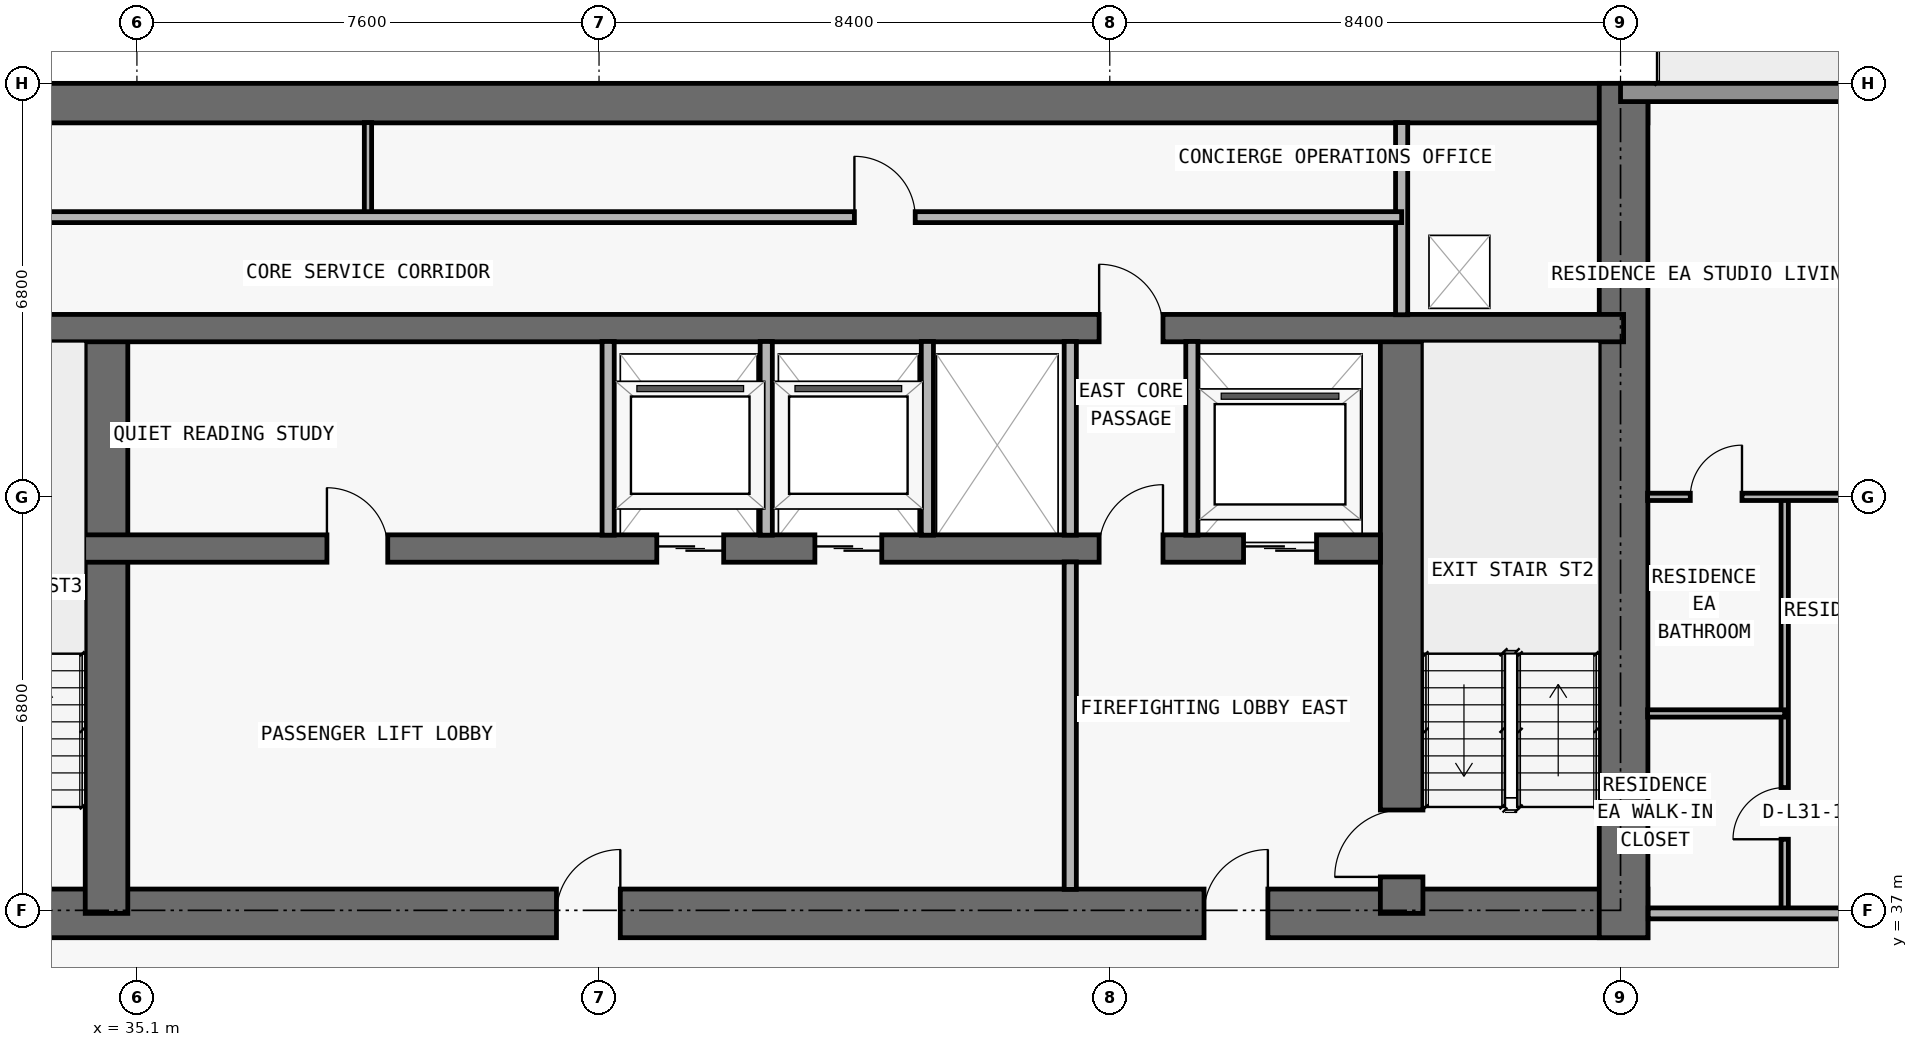
"""IFC4 building model, lengths in metres.
Left out: names, types, materials, properties, quantities, classifications, styles, units other than length and angle.
Written with IfcOpenShell. Run it as: python <this file> out.ifc"""

import sys

from ifc_helpers import new_model, si_unit, direction, frame, frame_2d, origin, place, context, subcontext, project, spatial, rectangle, extrude, element, fill, save


model = new_model("IFC4")
c1 = context("Model", 3, precision=1e-05, world=origin(), true_north=direction((0.0, 1.0)))
c2 = subcontext(c1, "Body", "Model", "MODEL_VIEW")
j1 = project(units=[si_unit("LENGTHUNIT", "METRE"), si_unit("PLANEANGLEUNIT", "RADIAN")], contexts=[c1])
p1 = place(None, origin())
s1 = spatial("IfcSite", under=j1, at=p1, CompositionType="ELEMENT")
p2 = place(p1, origin())
s2 = spatial("IfcBuilding", under=s1, at=p2, CompositionType="ELEMENT")
p3 = place(p2, frame((0.0, 0.0, 115.8)))
s3 = spatial("IfcBuildingStorey", under=s2, at=p3, CompositionType="ELEMENT", Elevation=115.8)
p4 = place(p3, frame((17.85, 36.95, 0.0), z_axis=(0.0, 0.0, 1.0), x_axis=(1.0, 0.0, 0.0)))
e1 = element("IfcWall", 1, at=p4, inside=s3, PredefinedType="SHEAR", context=c2, shape_type="SweptSolid", body=[
    extrude(rectangle(XDim=42.1, YDim=0.8, at=frame_2d((21.05, 0.0))), origin(), (0.0, 0.0, 1.0), 3.05),
])
p5 = place(p4, frame((14.45, 0.0, 0.0)))
e2 = element("IfcOpeningElement", 2, at=p5, cuts=e1, PredefinedType="OPENING", context=c2, shape_type="SweptSolid", body=[
    extrude(rectangle(XDim=1.1, YDim=2.15, at=frame_2d((0.55, 1.075))), frame((0.0, 0.41, 0.0), z_axis=(0.0, -1.0, 0.0), x_axis=(1.0, 0.0, 0.0)), (0.0, 0.0, 1.0), 0.82),
])
p6 = place(p4, frame((6.3, 0.0, 0.0)))
e3 = element("IfcOpeningElement", 3, at=p6, cuts=e1, PredefinedType="OPENING", context=c2, shape_type="SweptSolid", body=[
    extrude(rectangle(XDim=1.05, YDim=2.15, at=frame_2d((0.525, 1.075))), frame((0.0, 0.41, 0.0), z_axis=(0.0, -1.0, 0.0), x_axis=(1.0, 0.0, 0.0)), (0.0, 0.0, 1.0), 0.82),
])
p7 = place(p4, frame((34.8, 0.0, 0.0)))
e4 = element("IfcOpeningElement", 4, at=p7, cuts=e1, PredefinedType="OPENING", context=c2, shape_type="SweptSolid", body=[
    extrude(rectangle(XDim=1.05, YDim=2.15, at=frame_2d((0.525, 1.075))), frame((0.0, 0.41, 0.0), z_axis=(0.0, -1.0, 0.0), x_axis=(1.0, 0.0, 0.0)), (0.0, 0.0, 1.0), 0.82),
])
p8 = place(p4, frame((10.913, 0.0, 0.0)))
e5 = element("IfcOpeningElement", 5, at=p8, cuts=e1, PredefinedType="OPENING", context=c2, shape_type="SweptSolid", body=[
    extrude(rectangle(XDim=1.05, YDim=2.15, at=frame_2d((0.525, 1.075))), frame((0.0, 0.41, 0.0), z_axis=(0.0, -1.0, 0.0), x_axis=(1.0, 0.0, 0.0)), (0.0, 0.0, 1.0), 0.82),
])
p9 = place(p4, frame((24.15, 0.0, 0.0)))
e6 = element("IfcOpeningElement", 6, at=p9, cuts=e1, PredefinedType="OPENING", context=c2, shape_type="SweptSolid", body=[
    extrude(rectangle(XDim=1.05, YDim=2.15, at=frame_2d((0.525, 1.075))), frame((0.0, 0.41, 0.0), z_axis=(0.0, -1.0, 0.0), x_axis=(1.0, 0.0, 0.0)), (0.0, 0.0, 1.0), 0.82),
])
p10 = place(p3, frame((17.85, 50.275, 0.0), z_axis=(0.0, 0.0, 1.0), x_axis=(1.0, 0.0, 0.0)))
e7 = element("IfcWall", 7, at=p10, inside=s3, PredefinedType="SHEAR", context=c2, shape_type="SweptSolid", body=[
    extrude(rectangle(XDim=42.1, YDim=0.65, at=frame_2d((21.05, 0.0))), origin(), (0.0, 0.0, 1.0), 3.05),
])
p11 = place(p3, frame((59.55, 36.55, 0.0), z_axis=(0.0, 0.0, 1.0), x_axis=(0.0, 1.0, 0.0)))
e8 = element("IfcWall", 8, at=p11, inside=s3, PredefinedType="SHEAR", context=c2, shape_type="SweptSolid", body=[
    extrude(rectangle(XDim=14.05, YDim=0.8, at=frame_2d((7.025, 0.0))), origin(), (0.0, 0.0, 1.0), 3.05),
])
p12 = place(p3, frame((55.9, 36.95, 0.0), z_axis=(0.0, 0.0, 1.0), x_axis=(0.0, 1.0, 0.0)))
e9 = element("IfcWall", 9, at=p12, inside=s3, PredefinedType="SHEAR", context=c2, shape_type="SweptSolid", body=[
    extrude(rectangle(XDim=9.625, YDim=0.7, at=frame_2d((4.812, 0.0))), origin(), (0.0, 0.0, 1.0), 3.05),
])
p13 = place(p12, frame((0.6, 0.0, 0.0)))
e10 = element("IfcOpeningElement", 10, at=p13, cuts=e9, PredefinedType="OPENING", context=c2, shape_type="SweptSolid", body=[
    extrude(rectangle(XDim=1.1, YDim=2.15, at=frame_2d((0.55, 1.075))), frame((0.0, 0.36, 0.0), z_axis=(0.0, -1.0, 0.0), x_axis=(1.0, 0.0, 0.0)), (0.0, 0.0, 1.0), 0.72),
])
p14 = place(p3, frame((34.6, 36.95, 0.0), z_axis=(0.0, 0.0, 1.0), x_axis=(0.0, 1.0, 0.0)))
e11 = element("IfcWall", 11, at=p14, inside=s3, PredefinedType="SHEAR", context=c2, shape_type="SweptSolid", body=[
    extrude(rectangle(XDim=9.625, YDim=0.7, at=frame_2d((4.812, 0.0))), origin(), (0.0, 0.0, 1.0), 3.05),
])
p15 = place(p3, frame((22.25, 42.95, 0.0), z_axis=(0.0, 0.0, 1.0), x_axis=(1.0, 0.0, 0.0)))
e12 = element("IfcWall", 12, at=p15, inside=s3, PredefinedType="SHEAR", context=c2, shape_type="SweptSolid", body=[
    extrude(rectangle(XDim=33.3, YDim=0.45, at=frame_2d((16.65, 0.0))), origin(), (0.0, 0.0, 1.0), 3.05),
])
p16 = place(p15, frame((1.05, 0.0, 0.0)))
e13 = element("IfcOpeningElement", 13, at=p16, cuts=e12, PredefinedType="OPENING", context=c2, shape_type="SweptSolid", body=[
    extrude(rectangle(XDim=1.2, YDim=2.2, at=frame_2d((0.6, 1.1))), frame((0.0, 0.235, 0.0), z_axis=(0.0, -1.0, 0.0), x_axis=(1.0, 0.0, 0.0)), (0.0, 0.0, 1.0), 0.47),
])
p17 = place(p15, frame((31.05, 0.0, 0.0)))
e14 = element("IfcOpeningElement", 14, at=p17, cuts=e12, PredefinedType="OPENING", context=c2, shape_type="SweptSolid", body=[
    extrude(rectangle(XDim=1.2, YDim=2.2, at=frame_2d((0.6, 1.1))), frame((0.0, 0.235, 0.0), z_axis=(0.0, -1.0, 0.0), x_axis=(1.0, 0.0, 0.0)), (0.0, 0.0, 1.0), 0.47),
])
p18 = place(p15, frame((21.4, 0.0, 0.0)))
e15 = element("IfcOpeningElement", 15, at=p18, cuts=e12, PredefinedType="OPENING", context=c2, shape_type="SweptSolid", body=[
    extrude(rectangle(XDim=1.1, YDim=2.2, at=frame_2d((0.55, 1.1))), frame((0.0, 0.235, 0.0), z_axis=(0.0, -1.0, 0.0), x_axis=(1.0, 0.0, 0.0)), (0.0, 0.0, 1.0), 0.47),
])
p19 = place(p15, frame((24.0, 0.0, 0.0)))
e16 = element("IfcOpeningElement", 16, at=p19, cuts=e12, PredefinedType="OPENING", context=c2, shape_type="SweptSolid", body=[
    extrude(rectangle(XDim=1.1, YDim=2.2, at=frame_2d((0.55, 1.1))), frame((0.0, 0.235, 0.0), z_axis=(0.0, -1.0, 0.0), x_axis=(1.0, 0.0, 0.0)), (0.0, 0.0, 1.0), 0.47),
])
p20 = place(p15, frame((3.625, 0.0, 0.0)))
e17 = element("IfcOpeningElement", 17, at=p20, cuts=e12, PredefinedType="OPENING", context=c2, shape_type="SweptSolid", body=[
    extrude(rectangle(XDim=1.05, YDim=2.15, at=frame_2d((0.525, 1.075))), frame((0.0, 0.235, 0.0), z_axis=(0.0, -1.0, 0.0), x_axis=(1.0, 0.0, 0.0)), (0.0, 0.0, 1.0), 0.47),
])
p21 = place(p15, frame((28.675, 0.0, 0.0)))
e18 = element("IfcOpeningElement", 18, at=p21, cuts=e12, PredefinedType="OPENING", context=c2, shape_type="SweptSolid", body=[
    extrude(rectangle(XDim=1.05, YDim=2.15, at=frame_2d((0.525, 1.075))), frame((0.0, 0.235, 0.0), z_axis=(0.0, -1.0, 0.0), x_axis=(1.0, 0.0, 0.0)), (0.0, 0.0, 1.0), 0.47),
])
p22 = place(p15, frame((15.975, 0.0, 0.0)))
e19 = element("IfcOpeningElement", 19, at=p22, cuts=e12, PredefinedType="OPENING", context=c2, shape_type="SweptSolid", body=[
    extrude(rectangle(XDim=1.0, YDim=2.2, at=frame_2d((0.5, 1.1))), frame((0.0, 0.235, 0.0), z_axis=(0.0, -1.0, 0.0), x_axis=(1.0, 0.0, 0.0)), (0.0, 0.0, 1.0), 0.47),
])
p23 = place(p3, frame((18.25, 46.575, 0.0), z_axis=(0.0, 0.0, 1.0), x_axis=(1.0, 0.0, 0.0)))
e20 = element("IfcWall", 20, at=p23, inside=s3, PredefinedType="SHEAR", context=c2, shape_type="SweptSolid", body=[
    extrude(rectangle(XDim=41.3, YDim=0.45, at=frame_2d((20.65, 0.0))), origin(), (0.0, 0.0, 1.0), 3.05),
])
p24 = place(p23, frame((7.625, 0.0, 0.0)))
e21 = element("IfcOpeningElement", 21, at=p24, cuts=e20, PredefinedType="OPENING", context=c2, shape_type="SweptSolid", body=[
    extrude(rectangle(XDim=1.05, YDim=2.15, at=frame_2d((0.525, 1.075))), frame((0.0, 0.235, 0.0), z_axis=(0.0, -1.0, 0.0), x_axis=(1.0, 0.0, 0.0)), (0.0, 0.0, 1.0), 0.47),
])
p25 = place(p23, frame((32.675, 0.0, 0.0)))
e22 = element("IfcOpeningElement", 22, at=p25, cuts=e20, PredefinedType="OPENING", context=c2, shape_type="SweptSolid", body=[
    extrude(rectangle(XDim=1.05, YDim=2.15, at=frame_2d((0.525, 1.075))), frame((0.0, 0.235, 0.0), z_axis=(0.0, -1.0, 0.0), x_axis=(1.0, 0.0, 0.0)), (0.0, 0.0, 1.0), 0.47),
])
p26 = place(p3, frame((59.5, 50.45, 0.0), z_axis=(0.0, 0.0, 1.0), x_axis=(1.0, 0.0, 0.0)))
e23 = element("IfcWall", 23, at=p26, inside=s3, PredefinedType="STANDARD", context=c2, shape_type="SweptSolid", body=[
    extrude(rectangle(XDim=10.6, YDim=0.3, at=frame_2d((5.3, 0.0))), origin(), (0.0, 0.0, 1.0), 3.05),
])
p27 = place(p26, frame((4.3, 0.0, 0.0)))
e24 = element("IfcOpeningElement", 24, at=p27, cuts=e23, PredefinedType="OPENING", context=c2, shape_type="SweptSolid", body=[
    extrude(rectangle(XDim=2.0, YDim=2.3, at=frame_2d((1.0, 1.15))), frame((0.0, 0.16, 0.0), z_axis=(0.0, -1.0, 0.0), x_axis=(1.0, 0.0, 0.0)), (0.0, 0.0, 1.0), 0.32),
])
p28 = place(p3, frame((38.9, 48.4, 0.0), z_axis=(0.0, 0.0, 1.0), x_axis=(0.0, 1.0, 0.0)))
e25 = element("IfcWall", 25, at=p28, inside=s3, PredefinedType="PARTITIONING", context=c2, shape_type="SweptSolid", body=[
    extrude(rectangle(XDim=1.555, YDim=0.12, at=frame_2d((0.778, 0.0))), origin(), (0.0, 0.0, 1.0), 3.05),
])
for number, where, z_axis, x_axis in (
    (26, (42.85, 43.17, 0.0), (0.0, 0.0, 1.0), (0.0, 1.0, 0.0)),
    (27, (45.45, 43.17, 0.0), (0.0, 0.0, 1.0), (0.0, 1.0, 0.0)),
    (28, (48.1, 43.17, 0.0), (0.0, 0.0, 1.0), (0.0, 1.0, 0.0)),
):
    element("IfcWall", number, at=place(p3, frame(where, z_axis=z_axis, x_axis=x_axis)), inside=s3, PredefinedType="PARTITIONING", context=c2, shape_type="SweptSolid", body=[
        extrude(rectangle(XDim=3.185, YDim=0.2, at=frame_2d((1.593, 0.0))), origin(), (0.0, 0.0, 1.0), 3.05),
    ])
p29 = place(p3, frame((50.45, 37.345, 0.0), z_axis=(0.0, 0.0, 1.0), x_axis=(0.0, 1.0, 0.0)))
e29 = element("IfcWall", 29, at=p29, inside=s3, PredefinedType="PARTITIONING", context=c2, shape_type="SweptSolid", body=[
    extrude(rectangle(XDim=5.385, YDim=0.2, at=frame_2d((2.692, 0.0))), origin(), (0.0, 0.0, 1.0), 3.05),
])
for number, where, z_axis, x_axis in (
    (30, (50.45, 43.17, 0.0), (0.0, 0.0, 1.0), (0.0, 1.0, 0.0)),
    (31, (52.45, 43.17, 0.0), (0.0, 0.0, 1.0), (0.0, 1.0, 0.0)),
):
    element("IfcWall", number, at=place(p3, frame(where, z_axis=z_axis, x_axis=x_axis)), inside=s3, PredefinedType="PARTITIONING", context=c2, shape_type="SweptSolid", body=[
        extrude(rectangle(XDim=3.185, YDim=0.2, at=frame_2d((1.593, 0.0))), origin(), (0.0, 0.0, 1.0), 3.05),
    ])
p30 = place(p3, frame((55.9, 46.795, 0.0), z_axis=(0.0, 0.0, 1.0), x_axis=(0.0, 1.0, 0.0)))
e32 = element("IfcWall", 32, at=p30, inside=s3, PredefinedType="PARTITIONING", context=c2, shape_type="SweptSolid", body=[
    extrude(rectangle(XDim=3.16, YDim=0.2, at=frame_2d((1.58, 0.0))), origin(), (0.0, 0.0, 1.0), 3.05),
])
p31 = place(p3, frame((62.2, 36.95, 0.0), z_axis=(0.0, 0.0, 1.0), x_axis=(0.0, 1.0, 0.0)))
e33 = element("IfcWall", 33, at=p31, inside=s3, PredefinedType="PARTITIONING", context=c2, shape_type="SweptSolid", body=[
    extrude(rectangle(XDim=6.85, YDim=0.12, at=frame_2d((3.425, 0.0))), origin(), (0.0, 0.0, 1.0), 3.05),
])
p32 = place(p31, frame((1.219, 0.0, 0.0)))
e34 = element("IfcOpeningElement", 34, at=p32, cuts=e33, PredefinedType="OPENING", context=c2, shape_type="SweptSolid", body=[
    extrude(rectangle(XDim=0.85, YDim=2.1, at=frame_2d((0.425, 1.05))), frame((0.0, 0.07, 0.0), z_axis=(0.0, -1.0, 0.0), x_axis=(1.0, 0.0, 0.0)), (0.0, 0.0, 1.0), 0.14),
])
p33 = place(p3, frame((59.955, 36.95, 0.0), z_axis=(0.0, 0.0, 1.0), x_axis=(1.0, 0.0, 0.0)))
e35 = element("IfcWall", 35, at=p33, inside=s3, PredefinedType="PARTITIONING", context=c2, shape_type="SweptSolid", body=[
    extrude(rectangle(XDim=10.145, YDim=0.18, at=frame_2d((5.073, 0.0))), origin(), (0.0, 0.0, 1.0), 3.05),
])
p34 = place(p33, frame((3.957, 0.0, 0.0)))
e36 = element("IfcOpeningElement", 36, at=p34, cuts=e35, PredefinedType="OPENING", context=c2, shape_type="SweptSolid", body=[
    extrude(rectangle(XDim=1.0, YDim=2.2, at=frame_2d((0.5, 1.1))), frame((0.0, 0.1, 0.0), z_axis=(0.0, -1.0, 0.0), x_axis=(1.0, 0.0, 0.0)), (0.0, 0.0, 1.0), 0.2),
])
p35 = place(p3, frame((59.945, 40.238, 0.0), z_axis=(0.0, 0.0, 1.0), x_axis=(1.0, 0.0, 0.0)))
e37 = element("IfcWall", 37, at=p35, inside=s3, PredefinedType="PARTITIONING", context=c2, shape_type="SweptSolid", body=[
    extrude(rectangle(XDim=2.255, YDim=0.12, at=frame_2d((1.127, 0.0))), origin(), (0.0, 0.0, 1.0), 3.05),
])
p36 = place(p3, frame((59.945, 43.8, 0.0), z_axis=(0.0, 0.0, 1.0), x_axis=(1.0, 0.0, 0.0)))
e38 = element("IfcWall", 38, at=p36, inside=s3, PredefinedType="PARTITIONING", context=c2, shape_type="SweptSolid", body=[
    extrude(rectangle(XDim=13.66, YDim=0.12, at=frame_2d((6.83, 0.0))), origin(), (0.0, 0.0, 1.0), 2.339),
])
p37 = place(p36, frame((4.017, 0.0, 0.0)))
e39 = element("IfcOpeningElement", 39, at=p37, cuts=e38, PredefinedType="OPENING", context=c2, shape_type="SweptSolid", body=[
    extrude(rectangle(XDim=0.9, YDim=2.15, at=frame_2d((0.45, 1.075))), frame((0.0, 0.07, 0.0), z_axis=(0.0, -1.0, 0.0), x_axis=(1.0, 0.0, 0.0)), (0.0, 0.0, 1.0), 0.14),
])
p38 = place(p36, frame((0.702, 0.0, 0.0)))
e40 = element("IfcOpeningElement", 40, at=p38, cuts=e38, PredefinedType="OPENING", context=c2, shape_type="SweptSolid", body=[
    extrude(rectangle(XDim=0.85, YDim=2.1, at=frame_2d((0.425, 1.05))), frame((0.0, 0.07, 0.0), z_axis=(0.0, -1.0, 0.0), x_axis=(1.0, 0.0, 0.0)), (0.0, 0.0, 1.0), 0.14),
])
p39 = place(p3, frame((21.9, 48.4, 0.0), z_axis=(0.0, 0.0, 1.0), x_axis=(1.0, 0.0, 0.0)))
e41 = element("IfcWall", 41, at=p39, inside=s3, PredefinedType="PARTITIONING", context=c2, shape_type="SweptSolid", body=[
    extrude(rectangle(XDim=34.0, YDim=0.18, at=frame_2d((17.0, 0.0))), origin(), (0.0, 0.0, 1.0), 3.05),
])
p40 = place(p39, frame((8.0, 0.0, 0.0)))
e42 = element("IfcOpeningElement", 42, at=p40, cuts=e41, PredefinedType="OPENING", context=c2, shape_type="SweptSolid", body=[
    extrude(rectangle(XDim=1.0, YDim=2.2, at=frame_2d((0.5, 1.1))), frame((0.0, 0.1, 0.0), z_axis=(0.0, -1.0, 0.0), x_axis=(1.0, 0.0, 0.0)), (0.0, 0.0, 1.0), 0.2),
])
p41 = place(p39, frame((25.0, 0.0, 0.0)))
e43 = element("IfcOpeningElement", 43, at=p41, cuts=e41, PredefinedType="OPENING", context=c2, shape_type="SweptSolid", body=[
    extrude(rectangle(XDim=1.0, YDim=2.2, at=frame_2d((0.5, 1.1))), frame((0.0, 0.1, 0.0), z_axis=(0.0, -1.0, 0.0), x_axis=(1.0, 0.0, 0.0)), (0.0, 0.0, 1.0), 0.2),
])
p42 = place(p17, origin())
e44 = element("IfcDoor", 44, at=p42, inside=s3, OperationType="DOUBLE_DOOR_SLIDING", PredefinedType="DOOR", context=c2, shape_type="SweptSolid", body=[
    extrude(rectangle(XDim=1.2, YDim=2.2, at=frame_2d((0.6, 1.1))), frame((0.0, 0.025, 0.0), z_axis=(0.0, -1.0, 0.0), x_axis=(1.0, 0.0, 0.0)), (0.0, 0.0, 1.0), 0.05),
])
fill(e14, e44)
p43 = place(p18, origin())
e45 = element("IfcDoor", 45, at=p43, inside=s3, OperationType="DOUBLE_DOOR_SLIDING", PredefinedType="DOOR", context=c2, shape_type="SweptSolid", body=[
    extrude(rectangle(XDim=1.1, YDim=2.2, at=frame_2d((0.55, 1.1))), frame((0.0, 0.025, 0.0), z_axis=(0.0, -1.0, 0.0), x_axis=(1.0, 0.0, 0.0)), (0.0, 0.0, 1.0), 0.05),
])
fill(e15, e45)
p44 = place(p19, origin())
e46 = element("IfcDoor", 46, at=p44, inside=s3, OperationType="DOUBLE_DOOR_SLIDING", PredefinedType="DOOR", context=c2, shape_type="SweptSolid", body=[
    extrude(rectangle(XDim=1.1, YDim=2.2, at=frame_2d((0.55, 1.1))), frame((0.0, 0.025, 0.0), z_axis=(0.0, -1.0, 0.0), x_axis=(1.0, 0.0, 0.0)), (0.0, 0.0, 1.0), 0.05),
])
fill(e16, e46)
p45 = place(p7, origin())
e47 = element("IfcDoor", 47, at=p45, inside=s3, OperationType="SINGLE_SWING_RIGHT", PredefinedType="DOOR", context=c2, shape_type="SweptSolid", body=[
    extrude(rectangle(XDim=1.05, YDim=2.15, at=frame_2d((0.525, 1.075))), frame((0.0, 0.025, 0.0), z_axis=(0.0, -1.0, 0.0), x_axis=(1.0, 0.0, 0.0)), (0.0, 0.0, 1.0), 0.05),
])
fill(e4, e47)
p46 = place(p13, origin())
e48 = element("IfcDoor", 48, at=p46, inside=s3, OperationType="SINGLE_SWING_LEFT", PredefinedType="DOOR", context=c2, shape_type="SweptSolid", body=[
    extrude(rectangle(XDim=1.1, YDim=2.15, at=frame_2d((0.55, 1.075))), frame((0.0, 0.025, 0.0), z_axis=(0.0, -1.0, 0.0), x_axis=(1.0, 0.0, 0.0)), (0.0, 0.0, 1.0), 0.05),
])
fill(e10, e48)
p47 = place(p21, origin())
e49 = element("IfcDoor", 49, at=p47, inside=s3, OperationType="SINGLE_SWING_RIGHT", PredefinedType="DOOR", context=c2, shape_type="SweptSolid", body=[
    extrude(rectangle(XDim=1.05, YDim=2.15, at=frame_2d((0.525, 1.075))), frame((0.0, 0.025, 0.0), z_axis=(0.0, -1.0, 0.0), x_axis=(1.0, 0.0, 0.0)), (0.0, 0.0, 1.0), 0.05),
])
fill(e18, e49)
p48 = place(p9, origin())
e50 = element("IfcDoor", 50, at=p48, inside=s3, OperationType="SINGLE_SWING_RIGHT", PredefinedType="DOOR", context=c2, shape_type="SweptSolid", body=[
    extrude(rectangle(XDim=1.05, YDim=2.15, at=frame_2d((0.525, 1.075))), frame((0.0, 0.025, 0.0), z_axis=(0.0, -1.0, 0.0), x_axis=(1.0, 0.0, 0.0)), (0.0, 0.0, 1.0), 0.05),
])
fill(e6, e50)
p49 = place(p22, origin())
e51 = element("IfcDoor", 51, at=p49, inside=s3, OperationType="SINGLE_SWING_LEFT", PredefinedType="DOOR", context=c2, shape_type="SweptSolid", body=[
    extrude(rectangle(XDim=1.0, YDim=2.2, at=frame_2d((0.5, 1.1))), frame((0.0, 0.025, 0.0), z_axis=(0.0, -1.0, 0.0), x_axis=(1.0, 0.0, 0.0)), (0.0, 0.0, 1.0), 0.05),
])
fill(e19, e51)
p50 = place(p25, origin())
e52 = element("IfcDoor", 52, at=p50, inside=s3, OperationType="SINGLE_SWING_LEFT", PredefinedType="DOOR", context=c2, shape_type="SweptSolid", body=[
    extrude(rectangle(XDim=1.05, YDim=2.15, at=frame_2d((0.525, 1.075))), frame((0.0, 0.025, 0.0), z_axis=(0.0, -1.0, 0.0), x_axis=(1.0, 0.0, 0.0)), (0.0, 0.0, 1.0), 0.05),
])
fill(e22, e52)
p51 = place(p41, origin())
e53 = element("IfcDoor", 53, at=p51, inside=s3, OperationType="SINGLE_SWING_LEFT", PredefinedType="DOOR", context=c2, shape_type="SweptSolid", body=[
    extrude(rectangle(XDim=1.0, YDim=2.2, at=frame_2d((0.5, 1.1))), frame((0.0, 0.025, 0.0), z_axis=(0.0, -1.0, 0.0), x_axis=(1.0, 0.0, 0.0)), (0.0, 0.0, 1.0), 0.05),
])
fill(e43, e53)
p52 = place(p32, origin())
e54 = element("IfcDoor", 54, at=p52, inside=s3, OperationType="SINGLE_SWING_LEFT", PredefinedType="DOOR", context=c2, shape_type="SweptSolid", body=[
    extrude(rectangle(XDim=0.85, YDim=2.1, at=frame_2d((0.425, 1.05))), frame((0.0, 0.025, 0.0), z_axis=(0.0, -1.0, 0.0), x_axis=(1.0, 0.0, 0.0)), (0.0, 0.0, 1.0), 0.05),
])
fill(e34, e54)
p53 = place(p38, origin())
e55 = element("IfcDoor", 55, at=p53, inside=s3, OperationType="SINGLE_SWING_RIGHT", PredefinedType="DOOR", context=c2, shape_type="SweptSolid", body=[
    extrude(rectangle(XDim=0.85, YDim=2.1, at=frame_2d((0.425, 1.05))), frame((0.0, 0.025, 0.0), z_axis=(0.0, -1.0, 0.0), x_axis=(1.0, 0.0, 0.0)), (0.0, 0.0, 1.0), 0.05),
])
fill(e40, e55)
save(model, sys.argv[1])
